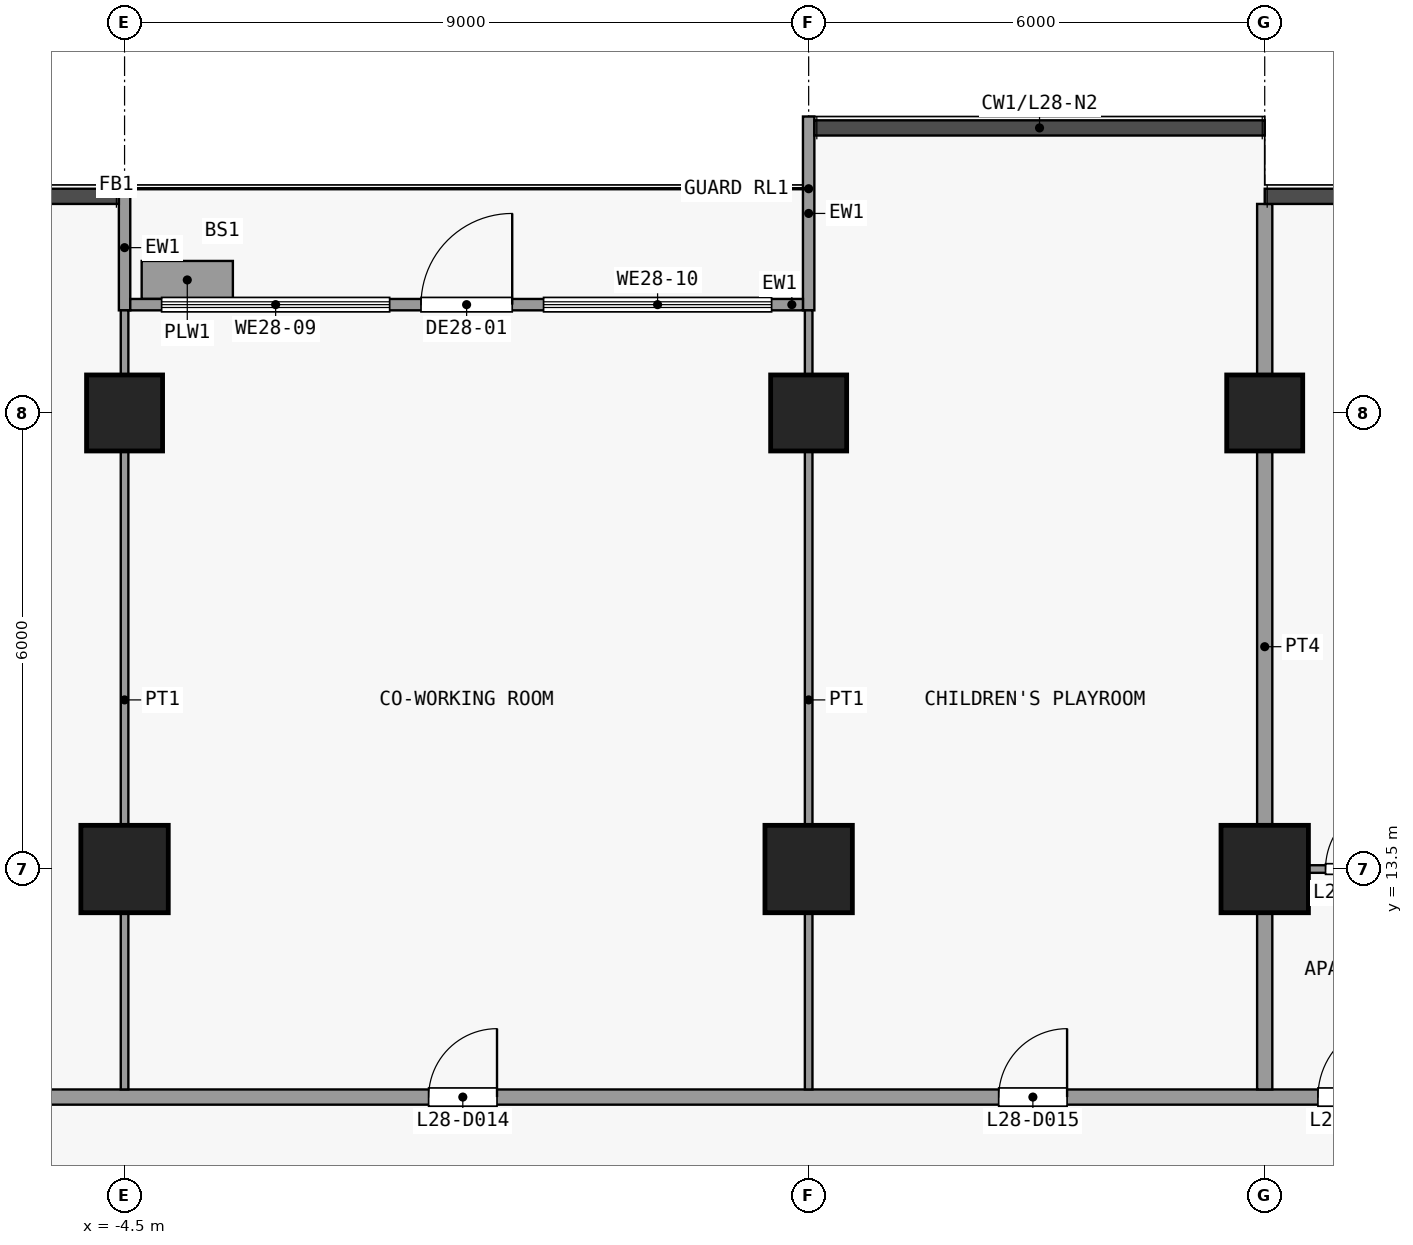
"""IFC4 building model, lengths in metres.
Left out: names, types, materials, properties, quantities, classifications, styles, units other than length and angle.
Written with IfcOpenShell. Run it as: python <this file> out.ifc"""

import sys

from ifc_helpers import new_model, si_unit, direction, frame, frame_2d, origin, origin_2d, place, context, subcontext, project, spatial, rectangle, extrude, element, fill, save


model = new_model("IFC4")
c1 = context("Model", 3, precision=1e-05, world=origin(), true_north=direction((0.0, 1.0)))
c2 = subcontext(c1, "Body", "Model", "MODEL_VIEW")
j1 = project(units=[si_unit("LENGTHUNIT", "METRE"), si_unit("PLANEANGLEUNIT", "RADIAN")], contexts=[c1])
p1 = place(None, origin())
s1 = spatial("IfcSite", under=j1, at=p1, CompositionType="ELEMENT")
p2 = place(p1, origin())
s2 = spatial("IfcBuilding", under=s1, at=p2, CompositionType="ELEMENT")
p3 = place(p2, frame((0.0, 0.0, 113.5)))
s3 = spatial("IfcBuildingStorey", under=s2, at=p3, CompositionType="ELEMENT", Elevation=113.5)
p4 = place(p3, frame((-4.5, 13.5, 0.0), z_axis=(0.0, 0.0, 1.0), x_axis=(1.0, 0.0, 0.0)))
e1 = element("IfcColumn", 1, at=p4, inside=s3, PredefinedType="COLUMN", context=c2, shape_type="SweptSolid", body=[
    extrude(rectangle(XDim=1.15, YDim=1.15, at=origin_2d()), origin(), (0.0, 0.0, 1.0), 3.6),
])
p5 = place(p3, frame((-4.5, 19.5, 0.0), z_axis=(0.0, 0.0, 1.0), x_axis=(1.0, 0.0, 0.0)))
e2 = element("IfcColumn", 2, at=p5, inside=s3, PredefinedType="COLUMN", context=c2, shape_type="SweptSolid", body=[
    extrude(rectangle(XDim=1.0, YDim=1.0, at=origin_2d()), origin(), (0.0, 0.0, 1.0), 3.6),
])
p6 = place(p3, frame((4.5, 13.5, 0.0), z_axis=(0.0, 0.0, 1.0), x_axis=(1.0, 0.0, 0.0)))
e3 = element("IfcColumn", 3, at=p6, inside=s3, PredefinedType="COLUMN", context=c2, shape_type="SweptSolid", body=[
    extrude(rectangle(XDim=1.15, YDim=1.15, at=origin_2d()), origin(), (0.0, 0.0, 1.0), 3.6),
])
p7 = place(p3, frame((4.5, 19.5, 0.0), z_axis=(0.0, 0.0, 1.0), x_axis=(1.0, 0.0, 0.0)))
e4 = element("IfcColumn", 4, at=p7, inside=s3, PredefinedType="COLUMN", context=c2, shape_type="SweptSolid", body=[
    extrude(rectangle(XDim=1.0, YDim=1.0, at=origin_2d()), origin(), (0.0, 0.0, 1.0), 3.6),
])
p8 = place(p3, frame((10.5, 13.5, 0.0), z_axis=(0.0, 0.0, 1.0), x_axis=(1.0, 0.0, 0.0)))
e5 = element("IfcColumn", 5, at=p8, inside=s3, PredefinedType="COLUMN", context=c2, shape_type="SweptSolid", body=[
    extrude(rectangle(XDim=1.15, YDim=1.15, at=origin_2d()), origin(), (0.0, 0.0, 1.0), 3.6),
])
p9 = place(p3, frame((10.5, 19.5, 0.0), z_axis=(0.0, 0.0, 1.0), x_axis=(1.0, 0.0, 0.0)))
e6 = element("IfcColumn", 6, at=p9, inside=s3, PredefinedType="COLUMN", context=c2, shape_type="SweptSolid", body=[
    extrude(rectangle(XDim=1.0, YDim=1.0, at=origin_2d()), origin(), (0.0, 0.0, 1.0), 3.6),
])
p10 = place(p3, frame((-4.5, 20.85, 0.0), z_axis=(0.0, 0.0, 1.0), x_axis=(0.0, 1.0, 0.0)))
e7 = element("IfcWall", 7, at=p10, inside=s3, PredefinedType="SOLIDWALL", context=c2, shape_type="SweptSolid", body=[
    extrude(rectangle(XDim=1.65, YDim=0.15, at=frame_2d((0.825, 0.0))), origin(), (0.0, 0.0, 1.0), 3.3),
])
p11 = place(p3, frame((4.5, 20.85, 0.0), z_axis=(0.0, 0.0, 1.0), x_axis=(0.0, 1.0, 0.0)))
e8 = element("IfcWall", 8, at=p11, inside=s3, PredefinedType="SOLIDWALL", context=c2, shape_type="SweptSolid", body=[
    extrude(rectangle(XDim=2.55, YDim=0.15, at=frame_2d((1.275, 0.0))), origin(), (0.0, 0.0, 1.0), 3.3),
])
p12 = place(p3, frame((-4.425, 20.925, 0.0), z_axis=(0.0, 0.0, 1.0), x_axis=(1.0, 0.0, 0.0)))
e9 = element("IfcWall", 9, at=p12, inside=s3, PredefinedType="SOLIDWALL", context=c2, shape_type="SweptSolid", body=[
    extrude(rectangle(XDim=8.85, YDim=0.15, at=frame_2d((4.425, 0.0))), origin(), (0.0, 0.0, 1.0), 3.3),
])
p13 = place(p12, frame((3.825, 0.0, 0.0)))
e10 = element("IfcOpeningElement", 10, at=p13, cuts=e9, PredefinedType="OPENING", context=c2, shape_type="SweptSolid", body=[
    extrude(rectangle(XDim=1.2, YDim=2.4, at=frame_2d((0.6, 1.2))), frame((0.0, 0.085, 0.0), z_axis=(0.0, -1.0, 0.0), x_axis=(1.0, 0.0, 0.0)), (0.0, 0.0, 1.0), 0.17),
])
p14 = place(p12, frame((0.413, 0.0, 0.9)))
e11 = element("IfcOpeningElement", 11, at=p14, cuts=e9, PredefinedType="OPENING", context=c2, shape_type="SweptSolid", body=[
    extrude(rectangle(XDim=3.0, YDim=2.1, at=frame_2d((1.5, 1.05))), frame((0.0, 0.085, 0.0), z_axis=(0.0, -1.0, 0.0), x_axis=(1.0, 0.0, 0.0)), (0.0, 0.0, 1.0), 0.17),
])
p15 = place(p12, frame((5.438, 0.0, 0.9)))
e12 = element("IfcOpeningElement", 12, at=p15, cuts=e9, PredefinedType="OPENING", context=c2, shape_type="SweptSolid", body=[
    extrude(rectangle(XDim=3.0, YDim=2.1, at=frame_2d((1.5, 1.05))), frame((0.0, 0.085, 0.0), z_axis=(0.0, -1.0, 0.0), x_axis=(1.0, 0.0, 0.0)), (0.0, 0.0, 1.0), 0.17),
])
p16 = place(p3, frame((-4.275, 21.25, 0.0), z_axis=(0.0, 0.0, 1.0), x_axis=(1.0, 0.0, 0.0)))
e13 = element("IfcWall", 13, at=p16, inside=s3, PredefinedType="USERDEFINED", context=c2, shape_type="SweptSolid", body=[
    extrude(rectangle(XDim=1.2, YDim=0.5, at=frame_2d((0.6, 0.0))), origin(), (0.0, 0.0, 1.0), 0.9),
])
p17 = place(p3, frame((-25.35, 10.5, 0.0), z_axis=(0.0, 0.0, 1.0), x_axis=(1.0, 0.0, 0.0)))
e14 = element("IfcWall", 14, at=p17, inside=s3, PredefinedType="PARTITIONING", context=c2, shape_type="SweptSolid", body=[
    extrude(rectangle(XDim=49.2, YDim=0.2, at=frame_2d((24.6, 0.0))), origin(), (0.0, 0.0, 1.0), 3.3),
])
p18 = place(p17, frame((10.55, 0.0, 0.0)))
e15 = element("IfcOpeningElement", 15, at=p18, cuts=e14, PredefinedType="OPENING", context=c2, shape_type="SweptSolid", body=[
    extrude(rectangle(XDim=1.0, YDim=2.1, at=frame_2d((0.5, 1.05))), frame((0.0, 0.11, 0.0), z_axis=(0.0, -1.0, 0.0), x_axis=(1.0, 0.0, 0.0)), (0.0, 0.0, 1.0), 0.22),
])
p19 = place(p17, frame((17.35, 0.0, 0.0)))
e16 = element("IfcOpeningElement", 16, at=p19, cuts=e14, PredefinedType="OPENING", context=c2, shape_type="SweptSolid", body=[
    extrude(rectangle(XDim=0.9, YDim=2.1, at=frame_2d((0.45, 1.05))), frame((0.0, 0.11, 0.0), z_axis=(0.0, -1.0, 0.0), x_axis=(1.0, 0.0, 0.0)), (0.0, 0.0, 1.0), 0.22),
])
p20 = place(p17, frame((24.85, 0.0, 0.0)))
e17 = element("IfcOpeningElement", 17, at=p20, cuts=e14, PredefinedType="OPENING", context=c2, shape_type="SweptSolid", body=[
    extrude(rectangle(XDim=0.9, YDim=2.1, at=frame_2d((0.45, 1.05))), frame((0.0, 0.11, 0.0), z_axis=(0.0, -1.0, 0.0), x_axis=(1.0, 0.0, 0.0)), (0.0, 0.0, 1.0), 0.22),
])
p21 = place(p17, frame((32.35, 0.0, 0.0)))
e18 = element("IfcOpeningElement", 18, at=p21, cuts=e14, PredefinedType="OPENING", context=c2, shape_type="SweptSolid", body=[
    extrude(rectangle(XDim=0.9, YDim=2.1, at=frame_2d((0.45, 1.05))), frame((0.0, 0.11, 0.0), z_axis=(0.0, -1.0, 0.0), x_axis=(1.0, 0.0, 0.0)), (0.0, 0.0, 1.0), 0.22),
])
p22 = place(p17, frame((36.55, 0.0, 0.0)))
e19 = element("IfcOpeningElement", 19, at=p22, cuts=e14, PredefinedType="OPENING", context=c2, shape_type="SweptSolid", body=[
    extrude(rectangle(XDim=1.0, YDim=2.1, at=frame_2d((0.5, 1.05))), frame((0.0, 0.11, 0.0), z_axis=(0.0, -1.0, 0.0), x_axis=(1.0, 0.0, 0.0)), (0.0, 0.0, 1.0), 0.22),
])
p23 = place(p17, frame((45.05, 0.0, 0.0)))
e20 = element("IfcOpeningElement", 20, at=p23, cuts=e14, PredefinedType="OPENING", context=c2, shape_type="SweptSolid", body=[
    extrude(rectangle(XDim=1.0, YDim=2.1, at=frame_2d((0.5, 1.05))), frame((0.0, 0.11, 0.0), z_axis=(0.0, -1.0, 0.0), x_axis=(1.0, 0.0, 0.0)), (0.0, 0.0, 1.0), 0.22),
])
p24 = place(p3, frame((10.6, 13.5, 0.0), z_axis=(0.0, 0.0, 1.0), x_axis=(1.0, 0.0, 0.0)))
e21 = element("IfcWall", 21, at=p24, inside=s3, PredefinedType="PARTITIONING", context=c2, shape_type="SweptSolid", body=[
    extrude(rectangle(XDim=2.3, YDim=0.1, at=frame_2d((1.15, 0.0))), origin(), (0.0, 0.0, 1.0), 3.3),
])
p25 = place(p24, frame((0.7, 0.0, 0.0)))
e22 = element("IfcOpeningElement", 22, at=p25, cuts=e21, PredefinedType="OPENING", context=c2, shape_type="SweptSolid", body=[
    extrude(rectangle(XDim=0.9, YDim=2.1, at=frame_2d((0.45, 1.05))), frame((0.0, 0.06, 0.0), z_axis=(0.0, -1.0, 0.0), x_axis=(1.0, 0.0, 0.0)), (0.0, 0.0, 1.0), 0.12),
])
for number, where, z_axis, x_axis in (
    (23, (-4.5, 10.6, 0.0), (0.0, 0.0, 1.0), (0.0, 1.0, 0.0)),
    (24, (4.5, 10.6, 0.0), (0.0, 0.0, 1.0), (0.0, 1.0, 0.0)),
):
    element("IfcWall", number, at=place(p3, frame(where, z_axis=z_axis, x_axis=x_axis)), inside=s3, PredefinedType="PARTITIONING", context=c2, shape_type="SweptSolid", body=[
        extrude(rectangle(XDim=10.25, YDim=0.1, at=frame_2d((5.125, 0.0))), origin(), (0.0, 0.0, 1.0), 3.3),
    ])
p26 = place(p3, frame((10.5, 10.6, 0.0), z_axis=(0.0, 0.0, 1.0), x_axis=(0.0, 1.0, 0.0)))
e25 = element("IfcWall", 25, at=p26, inside=s3, PredefinedType="PARTITIONING", context=c2, shape_type="SweptSolid", body=[
    extrude(rectangle(XDim=11.65, YDim=0.2, at=frame_2d((5.825, 0.0))), origin(), (0.0, 0.0, 1.0), 3.3),
])
p27 = place(p13, origin())
e26 = element("IfcDoor", 26, at=p27, inside=s3, OperationType="SINGLE_SWING_RIGHT", PredefinedType="DOOR", context=c2, shape_type="SweptSolid", body=[
    extrude(rectangle(XDim=1.2, YDim=2.4, at=frame_2d((0.6, 1.2))), frame((0.0, 0.025, 0.0), z_axis=(0.0, -1.0, 0.0), x_axis=(1.0, 0.0, 0.0)), (0.0, 0.0, 1.0), 0.05),
])
fill(e10, e26)
p28 = place(p14, origin())
e27 = element("IfcWindow", 27, at=p28, inside=s3, PartitioningType="SINGLE_PANEL", PredefinedType="WINDOW", context=c2, shape_type="SweptSolid", body=[
    extrude(rectangle(XDim=3.0, YDim=2.1, at=frame_2d((1.5, 1.05))), frame((0.0, 0.03, 0.0), z_axis=(0.0, -1.0, 0.0), x_axis=(1.0, 0.0, 0.0)), (0.0, 0.0, 1.0), 0.06),
])
fill(e11, e27)
p29 = place(p15, origin())
e28 = element("IfcWindow", 28, at=p29, inside=s3, PartitioningType="SINGLE_PANEL", PredefinedType="WINDOW", context=c2, shape_type="SweptSolid", body=[
    extrude(rectangle(XDim=3.0, YDim=2.1, at=frame_2d((1.5, 1.05))), frame((0.0, 0.03, 0.0), z_axis=(0.0, -1.0, 0.0), x_axis=(1.0, 0.0, 0.0)), (0.0, 0.0, 1.0), 0.06),
])
fill(e12, e28)
p30 = place(p20, origin())
e29 = element("IfcDoor", 29, at=p30, inside=s3, OperationType="SINGLE_SWING_LEFT", PredefinedType="DOOR", context=c2, shape_type="SweptSolid", body=[
    extrude(rectangle(XDim=0.9, YDim=2.1, at=frame_2d((0.45, 1.05))), frame((0.0, 0.025, 0.0), z_axis=(0.0, -1.0, 0.0), x_axis=(1.0, 0.0, 0.0)), (0.0, 0.0, 1.0), 0.05),
])
fill(e17, e29)
p31 = place(p21, origin())
e30 = element("IfcDoor", 30, at=p31, inside=s3, OperationType="SINGLE_SWING_LEFT", PredefinedType="DOOR", context=c2, shape_type="SweptSolid", body=[
    extrude(rectangle(XDim=0.9, YDim=2.1, at=frame_2d((0.45, 1.05))), frame((0.0, 0.025, 0.0), z_axis=(0.0, -1.0, 0.0), x_axis=(1.0, 0.0, 0.0)), (0.0, 0.0, 1.0), 0.05),
])
fill(e18, e30)
p32 = place(p22, origin())
e31 = element("IfcDoor", 31, at=p32, inside=s3, OperationType="SINGLE_SWING_LEFT", PredefinedType="DOOR", context=c2, shape_type="SweptSolid", body=[
    extrude(rectangle(XDim=1.0, YDim=2.1, at=frame_2d((0.5, 1.05))), frame((0.0, 0.025, 0.0), z_axis=(0.0, -1.0, 0.0), x_axis=(1.0, 0.0, 0.0)), (0.0, 0.0, 1.0), 0.05),
])
fill(e19, e31)
p33 = place(p25, origin())
e32 = element("IfcDoor", 32, at=p33, inside=s3, OperationType="SINGLE_SWING_LEFT", PredefinedType="DOOR", context=c2, shape_type="SweptSolid", body=[
    extrude(rectangle(XDim=0.9, YDim=2.1, at=frame_2d((0.45, 1.05))), frame((0.0, 0.025, 0.0), z_axis=(0.0, -1.0, 0.0), x_axis=(1.0, 0.0, 0.0)), (0.0, 0.0, 1.0), 0.05),
])
fill(e22, e32)
save(model, sys.argv[1])
